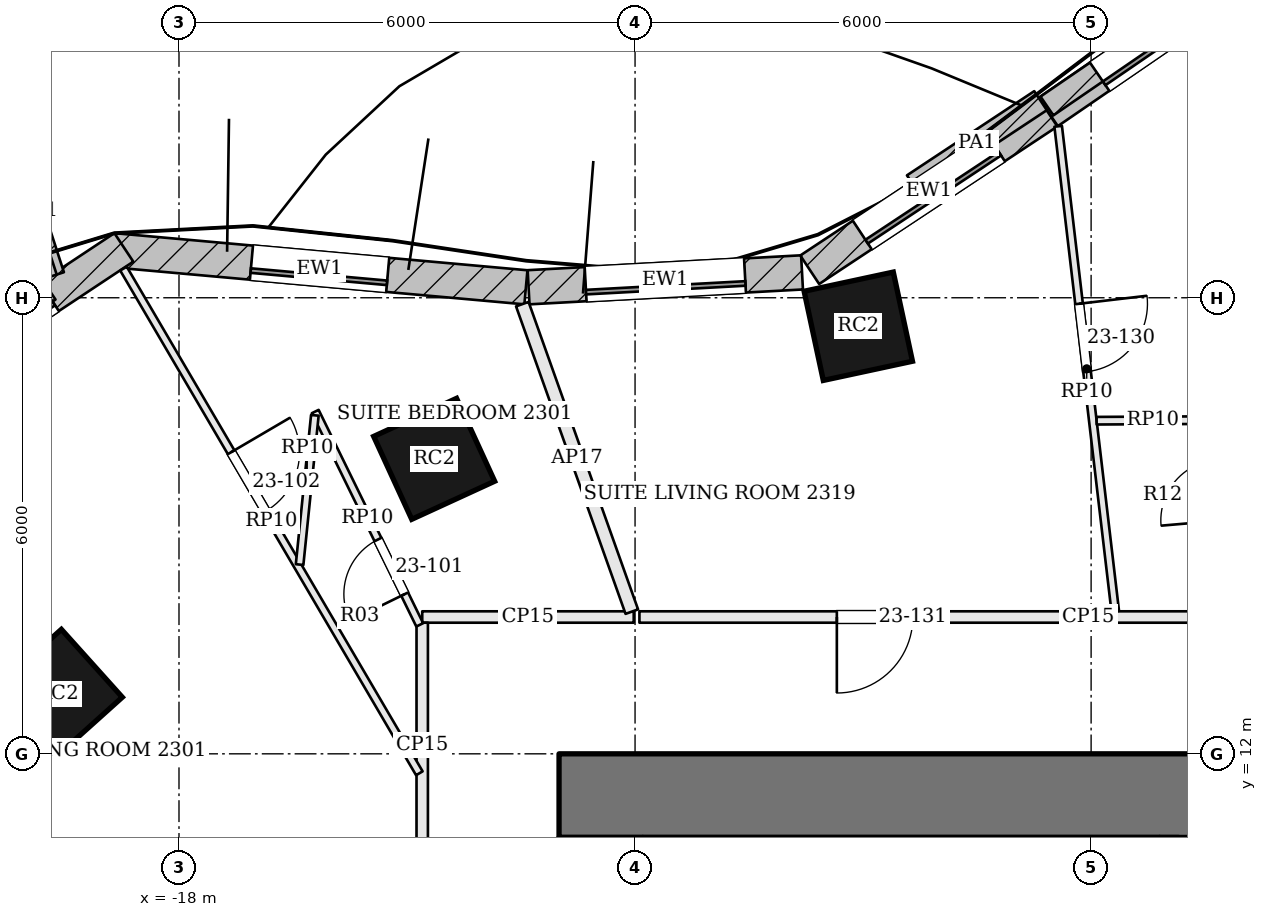
"""IFC4 building model, lengths in metres.
Left out: names, types, materials, properties, quantities, classifications, styles, units other than length and angle.
Written with IfcOpenShell. Run it as: python <this file> out.ifc"""

import sys

from ifc_helpers import new_model, si_unit, direction, frame, frame_2d, origin, origin_2d, place, context, subcontext, project, spatial, rectangle, extrude, element, fill, save


model = new_model("IFC4")
c1 = context("Model", 3, precision=1e-05, world=origin(), true_north=direction((0.0, 1.0)))
c2 = subcontext(c1, "Body", "Model", "MODEL_VIEW")
j1 = project(units=[si_unit("LENGTHUNIT", "METRE"), si_unit("PLANEANGLEUNIT", "RADIAN")], contexts=[c1])
p1 = place(None, origin())
s1 = spatial("IfcSite", under=j1, at=p1, CompositionType="ELEMENT")
p2 = place(p1, origin())
s2 = spatial("IfcBuilding", under=s1, at=p2, CompositionType="ELEMENT")
p3 = place(p2, frame((0.0, 0.0, 99.6)))
s3 = spatial("IfcBuildingStorey", under=s2, at=p3, CompositionType="ELEMENT", Elevation=99.6)
p4 = place(p3, frame((-13.0, 11.45, 0.0), z_axis=(0.0, 0.0, 1.0), x_axis=(1.0, 0.0, 0.0)))
e1 = element("IfcWall", 1, at=p4, inside=s3, PredefinedType="SHEAR", context=c2, shape_type="SweptSolid", body=[
    extrude(rectangle(XDim=26.0, YDim=1.1, at=frame_2d((13.0, 0.0))), origin(), (0.0, 0.0, 1.0), 3.6),
])
p5 = place(p4, frame((8.825, 0.0, 0.0)))
e2 = element("IfcOpeningElement", 2, at=p5, cuts=e1, PredefinedType="OPENING", context=c2, shape_type="SweptSolid", body=[
    extrude(rectangle(XDim=1.0, YDim=2.1, at=frame_2d((0.5, 1.05))), frame((0.0, 0.56, 0.0), z_axis=(0.0, -1.0, 0.0), x_axis=(1.0, 0.0, 0.0)), (0.0, 0.0, 1.0), 1.12),
])
p6 = place(p4, frame((12.1, 0.0, 0.0)))
e3 = element("IfcOpeningElement", 3, at=p6, cuts=e1, PredefinedType="OPENING", context=c2, shape_type="SweptSolid", body=[
    extrude(rectangle(XDim=1.0, YDim=2.1, at=frame_2d((0.5, 1.05))), frame((0.0, 0.56, 0.0), z_axis=(0.0, -1.0, 0.0), x_axis=(1.0, 0.0, 0.0)), (0.0, 0.0, 1.0), 1.12),
])
p7 = place(p4, frame((15.125, 0.0, 0.0)))
e4 = element("IfcOpeningElement", 4, at=p7, cuts=e1, PredefinedType="OPENING", context=c2, shape_type="SweptSolid", body=[
    extrude(rectangle(XDim=0.7, YDim=2.1, at=frame_2d((0.35, 1.05))), frame((0.0, 0.56, 0.0), z_axis=(0.0, -1.0, 0.0), x_axis=(1.0, 0.0, 0.0)), (0.0, 0.0, 1.0), 1.12),
])
p8 = place(p4, frame((16.65, 0.0, 0.0)))
e5 = element("IfcOpeningElement", 5, at=p8, cuts=e1, PredefinedType="OPENING", context=c2, shape_type="SweptSolid", body=[
    extrude(rectangle(XDim=0.9, YDim=2.1, at=frame_2d((0.45, 1.05))), frame((0.0, 0.56, 0.0), z_axis=(0.0, -1.0, 0.0), x_axis=(1.0, 0.0, 0.0)), (0.0, 0.0, 1.0), 1.12),
])
for number, where, z_axis, x_axis in (
    (6, (-9.063, 17.625, 0.0), (0.0, 0.0, 1.0), (-0.978, -0.21, 0.0)),
    (7, (-14.643, 15.881, 0.0), (0.0, 0.0, 1.0), (-0.909, -0.417, 0.0)),
    (8, (-19.593, 12.79, 0.0), (0.0, 0.0, 1.0), (-0.744, -0.668, 0.0)),
):
    element("IfcColumn", number, at=place(p3, frame(where, z_axis=z_axis, x_axis=x_axis)), inside=s3, PredefinedType="COLUMN", context=c2, shape_type="SweptSolid", body=[
        extrude(rectangle(XDim=1.2, YDim=1.2, at=origin_2d()), origin(), (0.0, 0.0, 1.0), 3.6),
    ])
p9 = place(p3, frame((-3.479, 22.56, 0.0), z_axis=(0.0, 0.0, 1.0), x_axis=(-0.824722766417, -0.565537230033, 0.0)))
e9 = element("IfcWall", 9, at=p9, inside=s3, PredefinedType="SOLIDWALL", context=c2, shape_type="SweptSolid", body=[
    extrude(rectangle(XDim=3.742, YDim=0.45, at=frame_2d((1.871, 0.0))), origin(), (0.0, 0.0, 1.0), 3.4),
])
p10 = place(p9, frame((0.821, 0.0, 0.9)))
e10 = element("IfcOpeningElement", 10, at=p10, cuts=e9, PredefinedType="OPENING", context=c2, shape_type="SweptSolid", body=[
    extrude(rectangle(XDim=2.1, YDim=2.0, at=frame_2d((1.05, 1.0))), frame((0.0, 0.235, 0.0), z_axis=(0.0, -1.0, 0.0), x_axis=(1.0, 0.0, 0.0)), (0.0, 0.0, 1.0), 0.47),
])
p11 = place(p3, frame((-6.568, 20.441, 0.0), z_axis=(0.0, 0.0, 1.0), x_axis=(-0.834034214531, -0.551712723246, 0.0)))
e11 = element("IfcWall", 11, at=p11, inside=s3, PredefinedType="SOLIDWALL", context=c2, shape_type="SweptSolid", body=[
    extrude(rectangle(XDim=3.757, YDim=0.45, at=frame_2d((1.879, 0.0))), origin(), (0.0, 0.0, 1.0), 3.4),
])
p12 = place(p11, frame((0.829, 0.0, 0.9)))
e12 = element("IfcOpeningElement", 12, at=p12, cuts=e11, PredefinedType="OPENING", context=c2, shape_type="SweptSolid", body=[
    extrude(rectangle(XDim=2.1, YDim=2.0, at=frame_2d((1.05, 1.0))), frame((0.0, 0.235, 0.0), z_axis=(0.0, -1.0, 0.0), x_axis=(1.0, 0.0, 0.0)), (0.0, 0.0, 1.0), 0.47),
])
p13 = place(p3, frame((-9.803, 18.334, 0.0), z_axis=(0.0, 0.0, 1.0), x_axis=(-0.998525941495, -0.054276552602, 0.0)))
e13 = element("IfcWall", 13, at=p13, inside=s3, PredefinedType="SOLIDWALL", context=c2, shape_type="SweptSolid", body=[
    extrude(rectangle(XDim=3.603, YDim=0.45, at=frame_2d((1.802, 0.0))), origin(), (0.0, 0.0, 1.0), 3.4),
])
p14 = place(p13, frame((0.751, 0.0, 0.9)))
e14 = element("IfcOpeningElement", 14, at=p14, cuts=e13, PredefinedType="OPENING", context=c2, shape_type="SweptSolid", body=[
    extrude(rectangle(XDim=2.1, YDim=2.0, at=frame_2d((1.05, 1.0))), frame((0.0, 0.235, 0.0), z_axis=(0.0, -1.0, 0.0), x_axis=(1.0, 0.0, 0.0)), (0.0, 0.0, 1.0), 0.47),
])
p15 = place(p3, frame((-13.436, 18.138, 0.0), z_axis=(0.0, 0.0, 1.0), x_axis=(-0.99598810213, 0.089485755376, 0.0)))
e15 = element("IfcWall", 15, at=p15, inside=s3, PredefinedType="SOLIDWALL", context=c2, shape_type="SweptSolid", body=[
    extrude(rectangle(XDim=5.451, YDim=0.45, at=frame_2d((2.726, 0.0))), origin(), (0.0, 0.0, 1.0), 3.4),
])
p16 = place(p15, frame((1.825, 0.0, 0.9)))
e16 = element("IfcOpeningElement", 16, at=p16, cuts=e15, PredefinedType="OPENING", context=c2, shape_type="SweptSolid", body=[
    extrude(rectangle(XDim=1.8, YDim=2.0, at=frame_2d((0.9, 1.0))), frame((0.0, 0.235, 0.0), z_axis=(0.0, -1.0, 0.0), x_axis=(1.0, 0.0, 0.0)), (0.0, 0.0, 1.0), 0.47),
])
p17 = place(p3, frame((-18.726, 18.663, 0.0), z_axis=(0.0, 0.0, 1.0), x_axis=(-0.83333921474, -0.552761931736, 0.0)))
e17 = element("IfcWall", 17, at=p17, inside=s3, PredefinedType="SOLIDWALL", context=c2, shape_type="SweptSolid", body=[
    extrude(rectangle(XDim=4.451, YDim=0.45, at=frame_2d((2.225, 0.0))), origin(), (0.0, 0.0, 1.0), 3.4),
])
p18 = place(p17, frame((1.175, 0.0, 0.9)))
e18 = element("IfcOpeningElement", 18, at=p18, cuts=e17, PredefinedType="OPENING", context=c2, shape_type="SweptSolid", body=[
    extrude(rectangle(XDim=2.1, YDim=2.0, at=frame_2d((1.05, 1.0))), frame((0.0, 0.235, 0.0), z_axis=(0.0, -1.0, 0.0), x_axis=(1.0, 0.0, 0.0)), (0.0, 0.0, 1.0), 0.47),
])
p19 = place(p3, frame((-19.609, 18.305, 0.0), z_axis=(0.0, 0.0, 1.0), x_axis=(-0.308600224758, 0.951191832008, 0.0)))
e19 = element("IfcWall", 19, at=p19, inside=s3, PredefinedType="SOLIDWALL", context=c2, shape_type="SweptSolid", body=[
    extrude(rectangle(XDim=1.75, YDim=0.2, at=frame_2d((0.875, 0.0))), origin(), (0.0, 0.0, 1.0), 3.4),
])
p20 = place(p3, frame((-3.599, 22.568, 3.6), z_axis=(0.0, 0.0, 1.0), x_axis=(-0.82476034254, -0.565482428881, 0.0)))
e20 = element("IfcWall", 20, at=p20, inside=s3, PredefinedType="PARAPET", context=c2, shape_type="SweptSolid", body=[
    extrude(rectangle(XDim=3.616, YDim=0.3, at=frame_2d((1.808, 0.0))), origin(), (0.0, 0.0, 1.0), 1.1),
])
p21 = place(p3, frame((-6.665, 20.593, 3.6), z_axis=(0.0, 0.0, 1.0), x_axis=(-0.834027642059, -0.551722658843, 0.0)))
e21 = element("IfcWall", 21, at=p21, inside=s3, PredefinedType="PARAPET", context=c2, shape_type="SweptSolid", body=[
    extrude(rectangle(XDim=2.008, YDim=0.3, at=frame_2d((1.004, 0.0))), origin(), (0.0, 0.0, 1.0), 1.1),
])
p22 = place(p3, frame((-19.708, 18.101, 3.6), z_axis=(0.0, 0.0, 1.0), x_axis=(-0.833370664286, -0.552714515738, 0.0)))
e22 = element("IfcWall", 22, at=p22, inside=s3, PredefinedType="PARAPET", context=c2, shape_type="SweptSolid", body=[
    extrude(rectangle(XDim=3.18, YDim=0.3, at=frame_2d((1.59, 0.0))), origin(), (0.0, 0.0, 1.0), 1.1),
])
p23 = place(p3, frame((-12.018, 13.8, 0.0), z_axis=(0.0, 0.0, 1.0), x_axis=(-1.0, 0.0, 0.0)))
e23 = element("IfcWall", 23, at=p23, inside=s3, PredefinedType="PARTITIONING", context=c2, shape_type="SweptSolid", body=[
    extrude(rectangle(XDim=2.782, YDim=0.15, at=frame_2d((1.391, 0.0))), origin(), (0.0, 0.0, 1.0), 2.784),
])
p24 = place(p3, frame((-14.8, 13.725, 0.0), z_axis=(0.0, 0.0, 1.0), x_axis=(0.0, -1.0, 0.0)))
e24 = element("IfcWall", 24, at=p24, inside=s3, PredefinedType="PARTITIONING", context=c2, shape_type="SweptSolid", body=[
    extrude(rectangle(XDim=3.228, YDim=0.15, at=frame_2d((1.614, 0.0))), origin(), (0.0, 0.0, 1.0), 2.784),
])
p25 = place(p3, frame((-13.483, 17.916, 0.0), z_axis=(0.0, 0.0, 1.0), x_axis=(0.335486303034, -0.9420450841, 0.0)))
e25 = element("IfcWall", 25, at=p25, inside=s3, PredefinedType="PARTITIONING", context=c2, shape_type="SweptSolid", body=[
    extrude(rectangle(XDim=4.294, YDim=0.175, at=frame_2d((2.147, 0.0))), origin(), (0.0, 0.0, 1.0), 2.784),
])
p26 = place(p3, frame((-0.132, 13.8, 0.0), z_axis=(0.0, 0.0, 1.0), x_axis=(-1.0, 0.0, 0.0)))
e26 = element("IfcWall", 26, at=p26, inside=s3, PredefinedType="PARTITIONING", context=c2, shape_type="SweptSolid", body=[
    extrude(rectangle(XDim=11.81, YDim=0.15, at=frame_2d((5.905, 0.0))), origin(), (0.0, 0.0, 1.0), 2.784),
])
p27 = place(p26, frame((8.213, 0.0, 0.0)))
e27 = element("IfcOpeningElement", 27, at=p27, cuts=e26, PredefinedType="OPENING", context=c2, shape_type="SweptSolid", body=[
    extrude(rectangle(XDim=1.0, YDim=2.1, at=frame_2d((0.5, 1.05))), frame((0.0, 0.085, 0.0), z_axis=(0.0, -1.0, 0.0), x_axis=(1.0, 0.0, 0.0)), (0.0, 0.0, 1.0), 0.17),
])
p28 = place(p3, frame((-18.73, 18.384, 0.0), z_axis=(0.0, 0.0, 1.0), x_axis=(0.505731710935, -0.862690811679, 0.0)))
e28 = element("IfcWall", 28, at=p28, inside=s3, PredefinedType="PARTITIONING", context=c2, shape_type="SweptSolid", body=[
    extrude(rectangle(XDim=7.697, YDim=0.1, at=frame_2d((3.848, 0.0))), origin(), (0.0, 0.0, 1.0), 2.784),
])
p29 = place(p28, frame((2.8, 0.0, 0.0)))
e29 = element("IfcOpeningElement", 29, at=p29, cuts=e28, PredefinedType="OPENING", context=c2, shape_type="SweptSolid", body=[
    extrude(rectangle(XDim=0.9, YDim=2.4, at=frame_2d((0.45, 1.2))), frame((0.0, 0.06, 0.0), z_axis=(0.0, -1.0, 0.0), x_axis=(1.0, 0.0, 0.0)), (0.0, 0.0, 1.0), 0.12),
])
p30 = place(p3, frame((-14.833, 13.697, 0.0), z_axis=(0.0, 0.0, 1.0), x_axis=(-0.439854589446, 0.898069006337, 0.0)))
e30 = element("IfcWall", 30, at=p30, inside=s3, PredefinedType="PARTITIONING", context=c2, shape_type="SweptSolid", body=[
    extrude(rectangle(XDim=3.125, YDim=0.1, at=frame_2d((1.562, 0.0))), origin(), (0.0, 0.0, 1.0), 2.784),
])
p31 = place(p30, frame((0.45, 0.0, 0.0)))
e31 = element("IfcOpeningElement", 31, at=p31, cuts=e30, PredefinedType="OPENING", context=c2, shape_type="SweptSolid", body=[
    extrude(rectangle(XDim=0.8, YDim=2.1, at=frame_2d((0.4, 1.05))), frame((0.0, 0.06, 0.0), z_axis=(0.0, -1.0, 0.0), x_axis=(1.0, 0.0, 0.0)), (0.0, 0.0, 1.0), 0.12),
])
p32 = place(p3, frame((-16.213, 16.453, 0.0), z_axis=(0.0, 0.0, 1.0), x_axis=(-0.101658565937, -0.99481934841, 0.0)))
e32 = element("IfcWall", 32, at=p32, inside=s3, PredefinedType="PARTITIONING", context=c2, shape_type="SweptSolid", body=[
    extrude(rectangle(XDim=1.974, YDim=0.1, at=frame_2d((0.987, 0.0))), origin(), (0.0, 0.0, 1.0), 2.784),
])
p33 = place(p3, frame((-6.433, 20.256, 0.0), z_axis=(0.0, 0.0, 1.0), x_axis=(0.116872110209, -0.993146972938, 0.0)))
e33 = element("IfcWall", 33, at=p33, inside=s3, PredefinedType="PARTITIONING", context=c2, shape_type="SweptSolid", body=[
    extrude(rectangle(XDim=6.426, YDim=0.1, at=frame_2d((3.213, 0.0))), origin(), (0.0, 0.0, 1.0), 2.784),
])
p34 = place(p33, frame((2.351, 0.0, 0.0)))
e34 = element("IfcOpeningElement", 34, at=p34, cuts=e33, PredefinedType="OPENING", context=c2, shape_type="SweptSolid", body=[
    extrude(rectangle(XDim=0.9, YDim=2.4, at=frame_2d((0.45, 1.2))), frame((0.0, 0.06, 0.0), z_axis=(0.0, -1.0, 0.0), x_axis=(1.0, 0.0, 0.0)), (0.0, 0.0, 1.0), 0.12),
])
p35 = place(p3, frame((-4.447, 16.39, 0.0), z_axis=(0.0, 0.0, 1.0), x_axis=(-0.999986933283, -0.005112070404, 0.0)))
e35 = element("IfcWall", 35, at=p35, inside=s3, PredefinedType="PARTITIONING", context=c2, shape_type="SweptSolid", body=[
    extrude(rectangle(XDim=1.48, YDim=0.1, at=frame_2d((0.74, 0.0))), origin(), (0.0, 0.0, 1.0), 2.784),
])
p36 = place(p10, origin())
e36 = element("IfcWindow", 36, at=p36, inside=s3, PartitioningType="SINGLE_PANEL", PredefinedType="WINDOW", context=c2, shape_type="SweptSolid", body=[
    extrude(rectangle(XDim=2.1, YDim=2.0, at=frame_2d((1.05, 1.0))), frame((0.0, 0.135, 0.0), z_axis=(0.0, -1.0, 0.0), x_axis=(1.0, 0.0, 0.0)), (0.0, 0.0, 1.0), 0.06),
])
fill(e10, e36)
p37 = place(p12, origin())
e37 = element("IfcWindow", 37, at=p37, inside=s3, PartitioningType="SINGLE_PANEL", PredefinedType="WINDOW", context=c2, shape_type="SweptSolid", body=[
    extrude(rectangle(XDim=2.1, YDim=2.0, at=frame_2d((1.05, 1.0))), frame((0.0, 0.135, 0.0), z_axis=(0.0, -1.0, 0.0), x_axis=(1.0, 0.0, 0.0)), (0.0, 0.0, 1.0), 0.06),
])
fill(e12, e37)
p38 = place(p14, origin())
e38 = element("IfcWindow", 38, at=p38, inside=s3, PartitioningType="SINGLE_PANEL", PredefinedType="WINDOW", context=c2, shape_type="SweptSolid", body=[
    extrude(rectangle(XDim=2.1, YDim=2.0, at=frame_2d((1.05, 1.0))), frame((0.0, 0.135, 0.0), z_axis=(0.0, -1.0, 0.0), x_axis=(1.0, 0.0, 0.0)), (0.0, 0.0, 1.0), 0.06),
])
fill(e14, e38)
p39 = place(p16, origin())
e39 = element("IfcWindow", 39, at=p39, inside=s3, PartitioningType="SINGLE_PANEL", PredefinedType="WINDOW", context=c2, shape_type="SweptSolid", body=[
    extrude(rectangle(XDim=1.8, YDim=2.0, at=frame_2d((0.9, 1.0))), frame((0.0, 0.135, 0.0), z_axis=(0.0, -1.0, 0.0), x_axis=(1.0, 0.0, 0.0)), (0.0, 0.0, 1.0), 0.06),
])
fill(e16, e39)
p40 = place(p18, origin())
e40 = element("IfcWindow", 40, at=p40, inside=s3, PartitioningType="SINGLE_PANEL", PredefinedType="WINDOW", context=c2, shape_type="SweptSolid", body=[
    extrude(rectangle(XDim=2.1, YDim=2.0, at=frame_2d((1.05, 1.0))), frame((0.0, 0.135, 0.0), z_axis=(0.0, -1.0, 0.0), x_axis=(1.0, 0.0, 0.0)), (0.0, 0.0, 1.0), 0.06),
])
fill(e18, e40)
p41 = place(p31, origin())
e41 = element("IfcDoor", 41, at=p41, inside=s3, OperationType="SINGLE_SWING_LEFT", PredefinedType="DOOR", context=c2, shape_type="SweptSolid", body=[
    extrude(rectangle(XDim=0.8, YDim=2.1, at=frame_2d((0.4, 1.05))), frame((0.0, 0.025, 0.0), z_axis=(0.0, -1.0, 0.0), x_axis=(1.0, 0.0, 0.0)), (0.0, 0.0, 1.0), 0.05),
])
fill(e31, e41)
p42 = place(p29, origin())
e42 = element("IfcDoor", 42, at=p42, inside=s3, OperationType="SINGLE_SWING_LEFT", PredefinedType="DOOR", context=c2, shape_type="SweptSolid", body=[
    extrude(rectangle(XDim=0.9, YDim=2.4, at=frame_2d((0.45, 1.2))), frame((0.0, 0.025, 0.0), z_axis=(0.0, -1.0, 0.0), x_axis=(1.0, 0.0, 0.0)), (0.0, 0.0, 1.0), 0.05),
])
fill(e29, e42)
p43 = place(p34, origin())
e43 = element("IfcDoor", 43, at=p43, inside=s3, OperationType="SINGLE_SWING_LEFT", PredefinedType="DOOR", context=c2, shape_type="SweptSolid", body=[
    extrude(rectangle(XDim=0.9, YDim=2.4, at=frame_2d((0.45, 1.2))), frame((0.0, 0.025, 0.0), z_axis=(0.0, -1.0, 0.0), x_axis=(1.0, 0.0, 0.0)), (0.0, 0.0, 1.0), 0.05),
])
fill(e34, e43)
p44 = place(p27, origin())
e44 = element("IfcDoor", 44, at=p44, inside=s3, OperationType="SINGLE_SWING_RIGHT", PredefinedType="DOOR", context=c2, shape_type="SweptSolid", body=[
    extrude(rectangle(XDim=1.0, YDim=2.1, at=frame_2d((0.5, 1.05))), frame((0.0, 0.025, 0.0), z_axis=(0.0, -1.0, 0.0), x_axis=(1.0, 0.0, 0.0)), (0.0, 0.0, 1.0), 0.05),
])
fill(e27, e44)
save(model, sys.argv[1])
